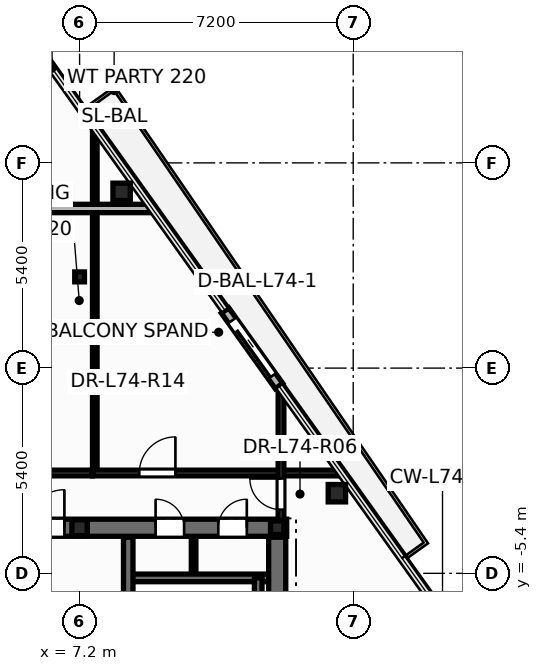
"""IFC4 building model, lengths in metres.
Left out: names, types, materials, properties, quantities, classifications, styles, units other than length and angle.
Written with IfcOpenShell. Run it as: python <this file> out.ifc"""

import sys

from ifc_helpers import new_model, si_unit, direction, frame, frame_2d, origin, origin_2d, place, context, subcontext, project, spatial, rectangle, hollow_circle, i_section, extrude, element, fill, save


model = new_model("IFC4")
c1 = context("Model", 3, precision=1e-05, world=origin(), true_north=direction((0.0, 1.0)))
c2 = subcontext(c1, "Body", "Model", "MODEL_VIEW")
j1 = project(units=[si_unit("LENGTHUNIT", "METRE"), si_unit("PLANEANGLEUNIT", "RADIAN")], contexts=[c1])
p1 = place(None, origin())
s1 = spatial("IfcSite", under=j1, at=p1, CompositionType="ELEMENT")
p2 = place(p1, origin())
s2 = spatial("IfcBuilding", under=s1, at=p2, CompositionType="ELEMENT")
p3 = place(p2, frame((0.0, 0.0, 281.4)))
s3 = spatial("IfcBuildingStorey", under=s2, at=p3, CompositionType="ELEMENT", Elevation=281.4)
for number, where, z_axis, x_axis in (
    (1, (13.97, -3.292, 0.0), (0.0, 0.0, 1.0), (1.0, 0.0, 0.0)),
    (2, (8.306, 4.638, 0.0), (0.0, 0.0, 1.0), (1.0, 0.0, 0.0)),
):
    element("IfcColumn", number, at=place(p3, frame(where, z_axis=z_axis, x_axis=x_axis)), inside=s3, PredefinedType="COLUMN", context=c2, shape_type="SweptSolid", body=[
        extrude(hollow_circle(Radius=0.229, WallThickness=0.016, at=origin_2d()), origin(), (0.0, 0.0, 1.0), 3.6),
    ])
p4 = place(p3, frame((12.4, -4.2, 0.0), z_axis=(0.0, 0.0, 1.0), x_axis=(1.0, 0.0, 0.0)))
e3 = element("IfcColumn", 3, at=p4, inside=s3, PredefinedType="COLUMN", context=c2, shape_type="SweptSolid", body=[
    extrude(i_section(OverallWidth=0.352, OverallDepth=0.359, WebThickness=0.018, FlangeThickness=0.026, at=origin_2d()), origin(), (0.0, 0.0, 1.0), 3.6),
])
p5 = place(p3, frame((7.2, -4.2, 0.0), z_axis=(0.0, 0.0, 1.0), x_axis=(1.0, 0.0, 0.0)))
e4 = element("IfcColumn", 4, at=p5, inside=s3, PredefinedType="PILASTER", context=c2, shape_type="SweptSolid", body=[
    extrude(i_section(OverallWidth=0.405, OverallDepth=0.414, WebThickness=0.022, FlangeThickness=0.032, at=origin_2d()), origin(), (0.0, 0.0, 1.0), 3.6),
])
p6 = place(p3, frame((7.2, 2.4, 0.0), z_axis=(0.0, 0.0, 1.0), x_axis=(1.0, 0.0, 0.0)))
e5 = element("IfcColumn", 5, at=p6, inside=s3, PredefinedType="COLUMN", context=c2, shape_type="SweptSolid", body=[
    extrude(i_section(OverallWidth=0.256, OverallDepth=0.26, WebThickness=0.01, FlangeThickness=0.017, at=origin_2d()), origin(), (0.0, 0.0, 1.0), 3.6),
])
p7 = place(p3, frame((12.447, -0.471, -0.015), z_axis=(0.0, 0.0, 1.0), x_axis=(-0.581219264245, 0.813746991927, 0.0)))
e6 = element("IfcWall", 6, at=p7, inside=s3, PredefinedType="STANDARD", context=c2, shape_type="SweptSolid", body=[
    extrude(rectangle(XDim=2.44, YDim=0.24, at=frame_2d((1.22, 0.0))), origin(), (0.0, 0.0, 1.0), 2.853),
])
p8 = place(p7, frame((0.32, 0.0, 0.015)))
e7 = element("IfcOpeningElement", 7, at=p8, cuts=e6, PredefinedType="OPENING", context=c2, shape_type="SweptSolid", body=[
    extrude(rectangle(XDim=1.806, YDim=2.204, at=frame_2d((0.9, 1.102))), frame((0.0, 0.13, 0.0), z_axis=(0.0, -1.0, 0.0), x_axis=(1.0, 0.0, 0.0)), (0.0, 0.0, 1.0), 0.26),
])
p9 = place(p3, frame((10.2, -5.52, 0.0), z_axis=(0.0, 0.0, 1.0), x_axis=(0.0, 1.0, 0.0)))
e8 = element("IfcWall", 8, at=p9, inside=s3, PredefinedType="PARTITIONING", context=c2, shape_type="SweptSolid", body=[
    extrude(rectangle(XDim=1.12, YDim=0.12, at=frame_2d((0.56, 0.0))), origin(), (0.0, 0.0, 1.0), 3.32),
])
p10 = place(p3, frame((-12.65, -4.2, 0.0), z_axis=(0.0, 0.0, 1.0), x_axis=(1.0, 0.0, 0.0)))
e9 = element("IfcWall", 9, at=p10, inside=s3, PredefinedType="SHEAR", context=c2, shape_type="SweptSolid", body=[
    extrude(rectangle(XDim=25.3, YDim=0.45, at=frame_2d((12.65, 0.0))), origin(), (0.0, 0.0, 1.0), 3.6),
])
p11 = place(p10, frame((0.95, 0.0, 0.0)))
e10 = element("IfcOpeningElement", 10, at=p11, cuts=e9, PredefinedType="OPENING", context=c2, shape_type="SweptSolid", body=[
    extrude(rectangle(XDim=0.756, YDim=2.054, at=frame_2d((0.375, 1.027))), frame((0.0, 0.235, 0.0), z_axis=(0.0, -1.0, 0.0), x_axis=(1.0, 0.0, 0.0)), (0.0, 0.0, 1.0), 0.47),
])
p12 = place(p10, frame((2.6, 0.0, 0.0)))
e11 = element("IfcOpeningElement", 11, at=p12, cuts=e9, PredefinedType="OPENING", context=c2, shape_type="SweptSolid", body=[
    extrude(rectangle(XDim=0.756, YDim=2.054, at=frame_2d((0.375, 1.027))), frame((0.0, 0.235, 0.0), z_axis=(0.0, -1.0, 0.0), x_axis=(1.0, 0.0, 0.0)), (0.0, 0.0, 1.0), 0.47),
])
p13 = place(p10, frame((21.85, 0.0, 0.0)))
e12 = element("IfcOpeningElement", 12, at=p13, cuts=e9, PredefinedType="OPENING", context=c2, shape_type="SweptSolid", body=[
    extrude(rectangle(XDim=0.756, YDim=2.054, at=frame_2d((0.375, 1.027))), frame((0.0, 0.235, 0.0), z_axis=(0.0, -1.0, 0.0), x_axis=(1.0, 0.0, 0.0)), (0.0, 0.0, 1.0), 0.47),
])
p14 = place(p10, frame((23.5, 0.0, 0.0)))
e13 = element("IfcOpeningElement", 13, at=p14, cuts=e9, PredefinedType="OPENING", context=c2, shape_type="SweptSolid", body=[
    extrude(rectangle(XDim=0.756, YDim=2.054, at=frame_2d((0.375, 1.027))), frame((0.0, 0.235, 0.0), z_axis=(0.0, -1.0, 0.0), x_axis=(1.0, 0.0, 0.0)), (0.0, 0.0, 1.0), 0.47),
])
p15 = place(p10, frame((5.85, 0.0, 0.0)))
e14 = element("IfcOpeningElement", 14, at=p15, cuts=e9, PredefinedType="OPENING", context=c2, shape_type="SweptSolid", body=[
    extrude(rectangle(XDim=1.006, YDim=2.104, at=frame_2d((0.5, 1.052))), frame((0.0, 0.235, 0.0), z_axis=(0.0, -1.0, 0.0), x_axis=(1.0, 0.0, 0.0)), (0.0, 0.0, 1.0), 0.47),
])
p16 = place(p10, frame((10.35, 0.0, 0.0)))
e15 = element("IfcOpeningElement", 15, at=p16, cuts=e9, PredefinedType="OPENING", context=c2, shape_type="SweptSolid", body=[
    extrude(rectangle(XDim=1.406, YDim=2.154, at=frame_2d((0.7, 1.077))), frame((0.0, 0.235, 0.0), z_axis=(0.0, -1.0, 0.0), x_axis=(1.0, 0.0, 0.0)), (0.0, 0.0, 1.0), 0.47),
])
p17 = place(p10, frame((18.45, 0.0, 0.0)))
e16 = element("IfcOpeningElement", 16, at=p17, cuts=e9, PredefinedType="OPENING", context=c2, shape_type="SweptSolid", body=[
    extrude(rectangle(XDim=1.006, YDim=2.104, at=frame_2d((0.5, 1.052))), frame((0.0, 0.235, 0.0), z_axis=(0.0, -1.0, 0.0), x_axis=(1.0, 0.0, 0.0)), (0.0, 0.0, 1.0), 0.47),
])
p18 = place(p3, frame((8.48, -5.52, 0.0), z_axis=(0.0, 0.0, 1.0), x_axis=(1.0, 0.0, 0.0)))
e17 = element("IfcWall", 17, at=p18, inside=s3, PredefinedType="SOLIDWALL", context=c2, shape_type="SweptSolid", body=[
    extrude(rectangle(XDim=3.87, YDim=0.2, at=frame_2d((1.935, 0.0))), origin(), (0.0, 0.0, 1.0), 3.6),
])
p19 = place(p3, frame((11.9, -13.1, 0.0), z_axis=(0.0, 0.0, 1.0), x_axis=(0.0, 1.0, 0.0)))
e18 = element("IfcWall", 18, at=p19, inside=s3, PredefinedType="SOLIDWALL", context=c2, shape_type="SweptSolid", body=[
    extrude(rectangle(XDim=7.58, YDim=0.2, at=frame_2d((3.79, 0.0))), origin(), (0.0, 0.0, 1.0), 3.6),
])
p20 = place(p3, frame((8.48, -13.85, 0.0), z_axis=(0.0, 0.0, 1.0), x_axis=(0.0, 1.0, 0.0)))
e19 = element("IfcWall", 19, at=p20, inside=s3, PredefinedType="SHEAR", context=c2, shape_type="SweptSolid", body=[
    extrude(rectangle(XDim=9.4, YDim=0.25, at=frame_2d((4.7, 0.0))), origin(), (0.0, 0.0, 1.0), 3.6),
])
p21 = place(p20, frame((6.95, 0.0, 0.0)))
e20 = element("IfcOpeningElement", 20, at=p21, cuts=e19, PredefinedType="OPENING", context=c2, shape_type="SweptSolid", body=[
    extrude(rectangle(XDim=1.006, YDim=2.104, at=frame_2d((0.5, 1.052))), frame((0.0, 0.135, 0.0), z_axis=(0.0, -1.0, 0.0), x_axis=(1.0, 0.0, 0.0)), (0.0, 0.0, 1.0), 0.27),
])
p22 = place(p3, frame((12.4, -13.85, 0.0), z_axis=(0.0, 0.0, 1.0), x_axis=(0.0, 1.0, 0.0)))
e21 = element("IfcWall", 21, at=p22, inside=s3, PredefinedType="SHEAR", context=c2, shape_type="SweptSolid", body=[
    extrude(rectangle(XDim=9.4, YDim=0.45, at=frame_2d((4.7, 0.0))), origin(), (0.0, 0.0, 1.0), 3.6),
])
p23 = place(p3, frame((7.6, -2.76, 0.0), z_axis=(0.0, 0.0, 1.0), x_axis=(0.0, 1.0, 0.0)))
e22 = element("IfcWall", 22, at=p23, inside=s3, PredefinedType="PARTITIONING", context=c2, shape_type="SweptSolid", body=[
    extrude(rectangle(XDim=9.075, YDim=0.12, at=frame_2d((4.538, 0.0))), origin(), (0.0, 0.0, 1.0), 2.693),
])
p24 = place(p3, frame((2.36, 4.2, 0.0), z_axis=(0.0, 0.0, 1.0), x_axis=(1.0, 0.0, 0.0)))
e23 = element("IfcWall", 23, at=p24, inside=s3, PredefinedType="PARTITIONING", context=c2, shape_type="SweptSolid", body=[
    extrude(rectangle(XDim=6.75, YDim=0.22, at=frame_2d((3.375, 0.0))), origin(), (0.0, 0.0, 1.0), 2.693),
])
p25 = place(p3, frame((7.54, -2.76, 0.0), z_axis=(0.0, 0.0, 1.0), x_axis=(1.0, 0.0, 0.0)))
e24 = element("IfcWall", 24, at=p25, inside=s3, PredefinedType="PARTITIONING", context=c2, shape_type="SweptSolid", body=[
    extrude(rectangle(XDim=6.542, YDim=0.15, at=frame_2d((3.271, 0.0))), origin(), (0.0, 0.0, 1.0), 2.693),
])
p26 = place(p25, frame((1.231, 0.0, 0.0)))
e25 = element("IfcOpeningElement", 25, at=p26, cuts=e24, PredefinedType="OPENING", context=c2, shape_type="SweptSolid", body=[
    extrude(rectangle(XDim=0.956, YDim=2.104, at=frame_2d((0.475, 1.052))), frame((0.0, 0.085, 0.0), z_axis=(0.0, -1.0, 0.0), x_axis=(1.0, 0.0, 0.0)), (0.0, 0.0, 1.0), 0.17),
])
p27 = place(p3, frame((2.36, -2.76, 0.0), z_axis=(0.0, 0.0, 1.0), x_axis=(1.0, 0.0, 0.0)))
e26 = element("IfcWall", 26, at=p27, inside=s3, PredefinedType="PARTITIONING", context=c2, shape_type="SweptSolid", body=[
    extrude(rectangle(XDim=5.178, YDim=0.15, at=frame_2d((2.589, 0.0))), origin(), (0.0, 0.0, 1.0), 2.295),
])
p28 = place(p3, frame((12.5, -4.24, 0.0), z_axis=(0.0, 0.0, 1.0), x_axis=(0.0, 1.0, 0.0)))
e27 = element("IfcWall", 27, at=p28, inside=s3, PredefinedType="PARTITIONING", context=c2, shape_type="SweptSolid", body=[
    extrude(rectangle(XDim=3.695, YDim=0.15, at=frame_2d((1.848, 0.0))), origin(), (0.0, 0.0, 1.0), 2.295),
])
p29 = place(p28, frame((0.516, 0.0, 0.0)))
e28 = element("IfcOpeningElement", 28, at=p29, cuts=e27, PredefinedType="OPENING", context=c2, shape_type="SweptSolid", body=[
    extrude(rectangle(XDim=0.826, YDim=2.104, at=frame_2d((0.41, 1.052))), frame((0.0, 0.085, 0.0), z_axis=(0.0, -1.0, 0.0), x_axis=(1.0, 0.0, 0.0)), (0.0, 0.0, 1.0), 0.17),
])
p30 = place(p8, origin())
e29 = element("IfcDoor", 29, at=p30, inside=s3, OperationType="SLIDING_TO_LEFT", PredefinedType="DOOR", context=c2, shape_type="SweptSolid", body=[
    extrude(rectangle(XDim=1.8, YDim=2.2, at=frame_2d((0.9, 1.1))), frame((0.0, 0.025, 0.0), z_axis=(0.0, -1.0, 0.0), x_axis=(1.0, 0.0, 0.0)), (0.0, 0.0, 1.0), 0.05),
])
fill(e7, e29)
p31 = place(p13, origin())
e30 = element("IfcDoor", 30, at=p31, inside=s3, OperationType="SINGLE_SWING_LEFT", PredefinedType="DOOR", context=c2, shape_type="SweptSolid", body=[
    extrude(rectangle(XDim=0.75, YDim=2.05, at=frame_2d((0.375, 1.025))), frame((0.0, 0.025, 0.0), z_axis=(0.0, -1.0, 0.0), x_axis=(1.0, 0.0, 0.0)), (0.0, 0.0, 1.0), 0.05),
])
fill(e12, e30)
p32 = place(p14, origin())
e31 = element("IfcDoor", 31, at=p32, inside=s3, OperationType="SINGLE_SWING_RIGHT", PredefinedType="DOOR", context=c2, shape_type="SweptSolid", body=[
    extrude(rectangle(XDim=0.75, YDim=2.05, at=frame_2d((0.375, 1.025))), frame((0.0, 0.025, 0.0), z_axis=(0.0, -1.0, 0.0), x_axis=(1.0, 0.0, 0.0)), (0.0, 0.0, 1.0), 0.05),
])
fill(e13, e31)
p33 = place(p17, origin())
e32 = element("IfcDoor", 32, at=p33, inside=s3, OperationType="SINGLE_SWING_RIGHT", PredefinedType="DOOR", context=c2, shape_type="SweptSolid", body=[
    extrude(rectangle(XDim=1.0, YDim=2.1, at=frame_2d((0.5, 1.05))), frame((0.0, 0.025, 0.0), z_axis=(0.0, -1.0, 0.0), x_axis=(1.0, 0.0, 0.0)), (0.0, 0.0, 1.0), 0.05),
])
fill(e16, e32)
p34 = place(p29, origin())
e33 = element("IfcDoor", 33, at=p34, inside=s3, OperationType="SINGLE_SWING_RIGHT", PredefinedType="DOOR", context=c2, shape_type="SweptSolid", body=[
    extrude(rectangle(XDim=0.82, YDim=2.1, at=frame_2d((0.41, 1.05))), frame((0.0, 0.025, 0.0), z_axis=(0.0, -1.0, 0.0), x_axis=(1.0, 0.0, 0.0)), (0.0, 0.0, 1.0), 0.05),
])
fill(e28, e33)
p35 = place(p26, origin())
e34 = element("IfcDoor", 34, at=p35, inside=s3, OperationType="SINGLE_SWING_RIGHT", PredefinedType="DOOR", context=c2, shape_type="SweptSolid", body=[
    extrude(rectangle(XDim=0.95, YDim=2.1, at=frame_2d((0.475, 1.05))), frame((0.0, 0.025, 0.0), z_axis=(0.0, -1.0, 0.0), x_axis=(1.0, 0.0, 0.0)), (0.0, 0.0, 1.0), 0.05),
])
fill(e25, e34)
save(model, sys.argv[1])
